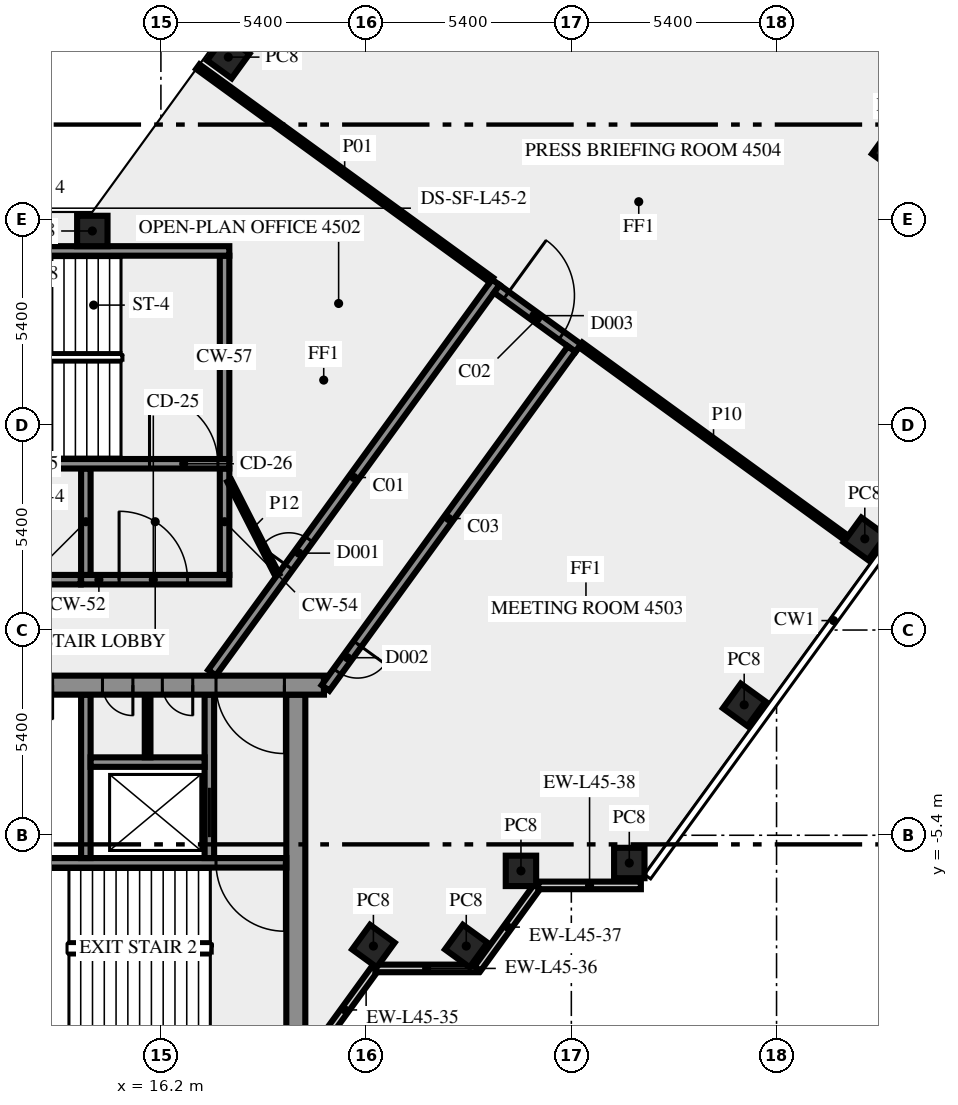
"""IFC4 building model, lengths in metres.
Left out: names, types, materials, properties, quantities, classifications, styles, units other than length and angle.
Written with IfcOpenShell. Run it as: python <this file> out.ifc"""

import sys

from ifc_helpers import new_model, si_unit, direction, frame, frame_2d, origin, origin_2d, place, context, subcontext, project, spatial, rectangle, extrude, element, fill, save


model = new_model("IFC4")
c1 = context("Model", 3, precision=1e-05, world=origin(), true_north=direction((0.0, 1.0)))
c2 = subcontext(c1, "Body", "Model", "MODEL_VIEW")
j1 = project(units=[si_unit("LENGTHUNIT", "METRE"), si_unit("PLANEANGLEUNIT", "RADIAN")], contexts=[c1])
p1 = place(None, origin())
s1 = spatial("IfcSite", under=j1, at=p1, CompositionType="ELEMENT")
p2 = place(p1, origin())
s2 = spatial("IfcBuilding", under=s1, at=p2, CompositionType="ELEMENT")
p3 = place(p2, frame((0.0, 0.0, 194.0)))
s3 = spatial("IfcBuildingStorey", under=s2, at=p3, CompositionType="ELEMENT", Elevation=194.0)
for number, where, z_axis, x_axis in (
    (1, (21.792, -8.315, 0.0), (0.0, 0.0, 1.0), (0.588, 0.809, 0.0)),
    (2, (24.235, -8.315, 0.0), (0.0, 0.0, 1.0), (0.588, 0.809, 0.0)),
    (3, (25.674, -6.337, 0.0), (0.0, 0.0, 1.0), (1.0, 0.0, 0.0)),
    (4, (28.525, -6.13, 0.0), (0.0, 0.0, 1.0), (1.0, 0.0, 0.0)),
    (5, (31.548, -1.969, 0.0), (0.0, 0.0, 1.0), (0.588, 0.809, 0.0)),
    (6, (34.722, 2.4, 0.0), (0.0, 0.0, 1.0), (0.588, 0.809, 0.0)),
    (7, (35.471, 12.616, 0.0), (0.0, 0.0, 1.0), (-0.809, 0.588, 0.0)),
    (8, (17.974, 15.075, 0.0), (0.0, 0.0, 1.0), (-0.588, -0.809, 0.0)),
    (9, (14.395, 10.5, 0.0), (0.0, 0.0, 1.0), (-1.0, 0.0, 0.0)),
):
    element("IfcColumn", number, at=place(p3, frame(where, z_axis=z_axis, x_axis=x_axis)), inside=s3, PredefinedType="COLUMN", context=c2, shape_type="SweptSolid", body=[
        extrude(rectangle(XDim=0.8, YDim=0.8, at=origin_2d()), origin(), (0.0, 0.0, 1.0), 3.65),
    ])
p4 = place(p3, frame((20.253, -11.083, 0.0), z_axis=(0.0, 0.0, 1.0), x_axis=(0.587766567315, 0.809030569476, 0.0)))
e10 = element("IfcWall", 10, at=p4, inside=s3, PredefinedType="SOLIDWALL", context=c2, shape_type="SweptSolid", body=[
    extrude(rectangle(XDim=2.688, YDim=0.2, at=frame_2d((1.344, 0.0))), origin(), (0.0, 0.0, 1.0), 3.65),
])
p5 = place(p3, frame((21.843, -8.904, 0.0), z_axis=(0.0, 0.0, 1.0), x_axis=(1.0, 0.0, 0.0)))
e11 = element("IfcWall", 11, at=p5, inside=s3, PredefinedType="SOLIDWALL", context=c2, shape_type="SweptSolid", body=[
    extrude(rectangle(XDim=2.7, YDim=0.2, at=frame_2d((1.35, 0.0))), origin(), (0.0, 0.0, 1.0), 3.65),
])
p6 = place(p3, frame((24.533, -8.909, 0.0), z_axis=(0.0, 0.0, 1.0), x_axis=(0.587720002413, 0.809064397168, 0.0)))
e12 = element("IfcWall", 12, at=p6, inside=s3, PredefinedType="SOLIDWALL", context=c2, shape_type="SweptSolid", body=[
    extrude(rectangle(XDim=2.7, YDim=0.2, at=frame_2d((1.35, 0.0))), origin(), (0.0, 0.0, 1.0), 3.65),
])
p7 = place(p3, frame((26.13, -6.719, 0.0), z_axis=(0.0, 0.0, 1.0), x_axis=(1.0, 0.0, 0.0)))
e13 = element("IfcWall", 13, at=p7, inside=s3, PredefinedType="SOLIDWALL", context=c2, shape_type="SweptSolid", body=[
    extrude(rectangle(XDim=2.7, YDim=0.2, at=frame_2d((1.35, 0.0))), origin(), (0.0, 0.0, 1.0), 3.65),
])
p8 = place(p3, frame((19.75, -10.5, 0.0), z_axis=(0.0, 0.0, 1.0), x_axis=(0.0, 1.0, 0.0)))
e14 = element("IfcWall", 14, at=p8, inside=s3, PredefinedType="SHEAR", context=c2, shape_type="SweptSolid", body=[
    extrude(rectangle(XDim=8.8, YDim=0.5, at=frame_2d((4.4, 0.0))), origin(), (0.0, 0.0, 1.0), 3.65),
])
p9 = place(p3, frame((19.5, -6.125, 0.0), z_axis=(0.0, 0.0, 1.0), x_axis=(-1.0, 0.0, 0.0)))
e15 = element("IfcWall", 15, at=p9, inside=s3, PredefinedType="SHEAR", context=c2, shape_type="SweptSolid", body=[
    extrude(rectangle(XDim=8.05, YDim=0.25, at=frame_2d((4.025, 0.0))), origin(), (0.0, 0.0, 1.0), 3.65),
])
p10 = place(p9, frame((0.05, 0.0, 0.0)))
e16 = element("IfcOpeningElement", 16, at=p10, cuts=e15, PredefinedType="OPENING", context=c2, shape_type="SweptSolid", body=[
    extrude(rectangle(XDim=1.8, YDim=2.1, at=frame_2d((0.9, 1.05))), frame((0.0, 0.135, 0.0), z_axis=(0.0, -1.0, 0.0), x_axis=(1.0, 0.0, 0.0)), (0.0, 0.0, 1.0), 0.27),
])
p11 = place(p3, frame((14.225, -6.0, 0.0), z_axis=(0.0, 0.0, 1.0), x_axis=(0.0, 1.0, 0.0)))
e17 = element("IfcWall", 17, at=p11, inside=s3, PredefinedType="SHEAR", context=c2, shape_type="SweptSolid", body=[
    extrude(rectangle(XDim=4.3, YDim=0.25, at=frame_2d((2.15, 0.0))), origin(), (0.0, 0.0, 1.0), 3.65),
])
p12 = place(p3, frame((17.475, -6.0, 0.0), z_axis=(0.0, 0.0, 1.0), x_axis=(0.0, 1.0, 0.0)))
e18 = element("IfcWall", 18, at=p12, inside=s3, PredefinedType="SHEAR", context=c2, shape_type="SweptSolid", body=[
    extrude(rectangle(XDim=4.3, YDim=0.25, at=frame_2d((2.15, 0.0))), origin(), (0.0, 0.0, 1.0), 3.65),
])
p13 = place(p12, frame((0.55, 0.0, 0.0)))
e19 = element("IfcOpeningElement", 19, at=p13, cuts=e18, PredefinedType="OPENING", context=c2, shape_type="SweptSolid", body=[
    extrude(rectangle(XDim=1.3, YDim=2.1, at=frame_2d((0.65, 1.05))), frame((0.0, 0.135, 0.0), z_axis=(0.0, -1.0, 0.0), x_axis=(1.0, 0.0, 0.0)), (0.0, 0.0, 1.0), 0.27),
])
p14 = place(p3, frame((14.35, -3.475, 0.0), z_axis=(0.0, 0.0, 1.0), x_axis=(1.0, 0.0, 0.0)))
e20 = element("IfcWall", 20, at=p14, inside=s3, PredefinedType="SHEAR", context=c2, shape_type="SweptSolid", body=[
    extrude(rectangle(XDim=3.0, YDim=0.25, at=frame_2d((1.5, 0.0))), origin(), (0.0, 0.0, 1.0), 3.65),
])
p15 = place(p3, frame((15.85, -3.35, 0.0), z_axis=(0.0, 0.0, 1.0), x_axis=(0.0, 1.0, 0.0)))
e21 = element("IfcWall", 21, at=p15, inside=s3, PredefinedType="PARTITIONING", context=c2, shape_type="SweptSolid", body=[
    extrude(rectangle(XDim=1.65, YDim=0.15, at=frame_2d((0.825, 0.0))), origin(), (0.0, 0.0, 1.0), 3.65),
])
p16 = place(p3, frame((20.49, -1.45, 0.0), z_axis=(0.0, 0.0, 1.0), x_axis=(-1.0, 0.0, 0.0)))
e22 = element("IfcWall", 22, at=p16, inside=s3, PredefinedType="SHEAR", context=c2, shape_type="SweptSolid", body=[
    extrude(rectangle(XDim=40.98, YDim=0.5, at=frame_2d((20.49, 0.0))), origin(), (0.0, 0.0, 1.0), 3.65),
])
p17 = place(p16, frame((38.14, 0.0, 0.0)))
e23 = element("IfcOpeningElement", 23, at=p17, cuts=e22, PredefinedType="OPENING", context=c2, shape_type="SweptSolid", body=[
    extrude(rectangle(XDim=1.8, YDim=2.1, at=frame_2d((0.9, 1.05))), frame((0.0, 0.26, 0.0), z_axis=(0.0, -1.0, 0.0), x_axis=(1.0, 0.0, 0.0)), (0.0, 0.0, 1.0), 0.52),
])
p18 = place(p16, frame((35.89, 0.0, 0.0)))
e24 = element("IfcOpeningElement", 24, at=p18, cuts=e22, PredefinedType="OPENING", context=c2, shape_type="SweptSolid", body=[
    extrude(rectangle(XDim=0.9, YDim=2.1, at=frame_2d((0.45, 1.05))), frame((0.0, 0.26, 0.0), z_axis=(0.0, -1.0, 0.0), x_axis=(1.0, 0.0, 0.0)), (0.0, 0.0, 1.0), 0.52),
])
p19 = place(p16, frame((32.94, 0.0, 0.0)))
e25 = element("IfcOpeningElement", 25, at=p19, cuts=e22, PredefinedType="OPENING", context=c2, shape_type="SweptSolid", body=[
    extrude(rectangle(XDim=0.9, YDim=2.1, at=frame_2d((0.45, 1.05))), frame((0.0, 0.26, 0.0), z_axis=(0.0, -1.0, 0.0), x_axis=(1.0, 0.0, 0.0)), (0.0, 0.0, 1.0), 0.52),
])
p20 = place(p16, frame((30.302, 0.0, 0.0)))
e26 = element("IfcOpeningElement", 26, at=p20, cuts=e22, PredefinedType="OPENING", context=c2, shape_type="SweptSolid", body=[
    extrude(rectangle(XDim=0.9, YDim=2.1, at=frame_2d((0.45, 1.05))), frame((0.0, 0.26, 0.0), z_axis=(0.0, -1.0, 0.0), x_axis=(1.0, 0.0, 0.0)), (0.0, 0.0, 1.0), 0.52),
])
p21 = place(p16, frame((26.577, 0.0, 0.0)))
e27 = element("IfcOpeningElement", 27, at=p21, cuts=e22, PredefinedType="OPENING", context=c2, shape_type="SweptSolid", body=[
    extrude(rectangle(XDim=0.9, YDim=2.1, at=frame_2d((0.45, 1.05))), frame((0.0, 0.26, 0.0), z_axis=(0.0, -1.0, 0.0), x_axis=(1.0, 0.0, 0.0)), (0.0, 0.0, 1.0), 0.52),
])
p22 = place(p16, frame((19.59, 0.0, 0.0)))
e28 = element("IfcOpeningElement", 28, at=p22, cuts=e22, PredefinedType="OPENING", context=c2, shape_type="SweptSolid", body=[
    extrude(rectangle(XDim=2.0, YDim=2.1, at=frame_2d((1.0, 1.05))), frame((0.0, 0.26, 0.0), z_axis=(0.0, -1.0, 0.0), x_axis=(1.0, 0.0, 0.0)), (0.0, 0.0, 1.0), 0.52),
])
p23 = place(p16, frame((7.14, 0.0, 0.0)))
e29 = element("IfcOpeningElement", 29, at=p23, cuts=e22, PredefinedType="OPENING", context=c2, shape_type="SweptSolid", body=[
    extrude(rectangle(XDim=0.9, YDim=2.1, at=frame_2d((0.45, 1.05))), frame((0.0, 0.26, 0.0), z_axis=(0.0, -1.0, 0.0), x_axis=(1.0, 0.0, 0.0)), (0.0, 0.0, 1.0), 0.52),
])
p24 = place(p16, frame((5.028, 0.0, 0.0)))
e30 = element("IfcOpeningElement", 30, at=p24, cuts=e22, PredefinedType="OPENING", context=c2, shape_type="SweptSolid", body=[
    extrude(rectangle(XDim=0.8, YDim=2.1, at=frame_2d((0.4, 1.05))), frame((0.0, 0.26, 0.0), z_axis=(0.0, -1.0, 0.0), x_axis=(1.0, 0.0, 0.0)), (0.0, 0.0, 1.0), 0.52),
])
p25 = place(p16, frame((3.452, 0.0, 0.0)))
e31 = element("IfcOpeningElement", 31, at=p25, cuts=e22, PredefinedType="OPENING", context=c2, shape_type="SweptSolid", body=[
    extrude(rectangle(XDim=0.8, YDim=2.1, at=frame_2d((0.4, 1.05))), frame((0.0, 0.26, 0.0), z_axis=(0.0, -1.0, 0.0), x_axis=(1.0, 0.0, 0.0)), (0.0, 0.0, 1.0), 0.52),
])
p26 = place(p16, frame((1.04, 0.0, 0.0)))
e32 = element("IfcOpeningElement", 32, at=p26, cuts=e22, PredefinedType="OPENING", context=c2, shape_type="SweptSolid", body=[
    extrude(rectangle(XDim=1.8, YDim=2.1, at=frame_2d((0.9, 1.05))), frame((0.0, 0.26, 0.0), z_axis=(0.0, -1.0, 0.0), x_axis=(1.0, 0.0, 0.0)), (0.0, 0.0, 1.0), 0.52),
])
p27 = place(p3, frame((14.1, 1.325, 0.0), z_axis=(0.0, 0.0, 1.0), x_axis=(1.0, 0.0, 0.0)))
e33 = element("IfcWall", 33, at=p27, inside=s3, PredefinedType="SHEAR", context=c2, shape_type="SweptSolid", body=[
    extrude(rectangle(XDim=3.9, YDim=0.25, at=frame_2d((1.95, 0.0))), origin(), (0.0, 0.0, 1.0), 3.65),
])
p28 = place(p27, frame((1.0, 0.0, 0.0)))
e34 = element("IfcOpeningElement", 34, at=p28, cuts=e33, PredefinedType="OPENING", context=c2, shape_type="SweptSolid", body=[
    extrude(rectangle(XDim=1.8, YDim=2.1, at=frame_2d((0.9, 1.05))), frame((0.0, 0.135, 0.0), z_axis=(0.0, -1.0, 0.0), x_axis=(1.0, 0.0, 0.0)), (0.0, 0.0, 1.0), 0.27),
])
for number, where, z_axis, x_axis in (
    (35, (14.225, 1.45, 0.0), (0.0, 0.0, 1.0), (0.0, 1.0, 0.0)),
    (36, (17.875, 1.45, 0.0), (0.0, 0.0, 1.0), (0.0, 1.0, 0.0)),
):
    element("IfcWall", number, at=place(p3, frame(where, z_axis=z_axis, x_axis=x_axis)), inside=s3, PredefinedType="SHEAR", context=c2, shape_type="SweptSolid", body=[
        extrude(rectangle(XDim=2.8, YDim=0.25, at=frame_2d((1.4, 0.0))), origin(), (0.0, 0.0, 1.0), 3.65),
    ])
p29 = place(p3, frame((7.5, 4.375, 0.0), z_axis=(0.0, 0.0, 1.0), x_axis=(1.0, 0.0, 0.0)))
e37 = element("IfcWall", 37, at=p29, inside=s3, PredefinedType="SHEAR", context=c2, shape_type="SweptSolid", body=[
    extrude(rectangle(XDim=10.5, YDim=0.25, at=frame_2d((5.25, 0.0))), origin(), (0.0, 0.0, 1.0), 3.65),
])
p30 = place(p29, frame((8.4, 0.0, 0.0)))
e38 = element("IfcOpeningElement", 38, at=p30, cuts=e37, PredefinedType="OPENING", context=c2, shape_type="SweptSolid", body=[
    extrude(rectangle(XDim=1.8, YDim=2.1, at=frame_2d((0.9, 1.05))), frame((0.0, 0.135, 0.0), z_axis=(0.0, -1.0, 0.0), x_axis=(1.0, 0.0, 0.0)), (0.0, 0.0, 1.0), 0.27),
])
p31 = place(p3, frame((17.875, 4.5, 0.0), z_axis=(0.0, 0.0, 1.0), x_axis=(0.0, 1.0, 0.0)))
e39 = element("IfcWall", 39, at=p31, inside=s3, PredefinedType="SHEAR", context=c2, shape_type="SweptSolid", body=[
    extrude(rectangle(XDim=5.35, YDim=0.25, at=frame_2d((2.675, 0.0))), origin(), (0.0, 0.0, 1.0), 3.65),
])
p32 = place(p3, frame((7.5, 9.975, 0.0), z_axis=(0.0, 0.0, 1.0), x_axis=(1.0, 0.0, 0.0)))
e40 = element("IfcWall", 40, at=p32, inside=s3, PredefinedType="SHEAR", context=c2, shape_type="SweptSolid", body=[
    extrude(rectangle(XDim=10.5, YDim=0.25, at=frame_2d((5.25, 0.0))), origin(), (0.0, 0.0, 1.0), 3.65),
])
p33 = place(p32, frame((2.0, 0.0, 1.0)))
e41 = element("IfcOpeningElement", 41, at=p33, cuts=e40, PredefinedType="OPENING", context=c2, shape_type="SweptSolid", body=[
    extrude(rectangle(XDim=1.2, YDim=1.2, at=frame_2d((0.6, 0.6))), frame((0.0, 0.135, 0.0), z_axis=(0.0, -1.0, 0.0), x_axis=(1.0, 0.0, 0.0)), (0.0, 0.0, 1.0), 0.27),
])
p34 = place(p3, frame((17.545, -1.125, 0.0), z_axis=(0.0, 0.0, 1.0), x_axis=(0.587796810203, 0.809008596935, 0.0)))
e42 = element("IfcWall", 42, at=p34, inside=s3, PredefinedType="SOLIDWALL", context=c2, shape_type="SweptSolid", body=[
    extrude(rectangle(XDim=12.703, YDim=0.25, at=frame_2d((6.352, 0.0))), origin(), (0.0, 0.0, 1.0), 3.65),
])
p35 = place(p34, frame((3.441, 0.0, 0.0)))
e43 = element("IfcOpeningElement", 43, at=p35, cuts=e42, PredefinedType="OPENING", context=c2, shape_type="SweptSolid", body=[
    extrude(rectangle(XDim=0.9, YDim=2.1, at=frame_2d((0.45, 1.05))), frame((0.0, 0.135, 0.0), z_axis=(0.0, -1.0, 0.0), x_axis=(1.0, 0.0, 0.0)), (0.0, 0.0, 1.0), 0.27),
])
p36 = place(p3, frame((25.039, 8.978, 0.0), z_axis=(0.0, 0.0, 1.0), x_axis=(0.809006914995, -0.587799125119, 0.0)))
e44 = element("IfcWall", 44, at=p36, inside=s3, PredefinedType="SOLIDWALL", context=c2, shape_type="SweptSolid", body=[
    extrude(rectangle(XDim=2.65, YDim=0.25, at=frame_2d((1.325, 0.0))), origin(), (0.0, 0.0, 1.0), 3.65),
])
p37 = place(p36, frame((0.301, 0.0, 0.0)))
e45 = element("IfcOpeningElement", 45, at=p37, cuts=e44, PredefinedType="OPENING", context=c2, shape_type="SweptSolid", body=[
    extrude(rectangle(XDim=1.8, YDim=2.1, at=frame_2d((0.9, 1.05))), frame((0.0, 0.135, 0.0), z_axis=(0.0, -1.0, 0.0), x_axis=(1.0, 0.0, 0.0)), (0.0, 0.0, 1.0), 0.27),
])
p38 = place(p3, frame((27.009, 7.392, 0.0), z_axis=(0.0, 0.0, 1.0), x_axis=(-0.587776457057, -0.809023384414, 0.0)))
e46 = element("IfcWall", 46, at=p38, inside=s3, PredefinedType="SOLIDWALL", context=c2, shape_type="SweptSolid", body=[
    extrude(rectangle(XDim=11.021, YDim=0.25, at=frame_2d((5.51, 0.0))), origin(), (0.0, 0.0, 1.0), 3.65),
])
p39 = place(p38, frame((9.588, 0.0, 0.0)))
e47 = element("IfcOpeningElement", 47, at=p39, cuts=e46, PredefinedType="OPENING", context=c2, shape_type="SweptSolid", body=[
    extrude(rectangle(XDim=0.9, YDim=2.1, at=frame_2d((0.45, 1.05))), frame((0.0, 0.135, 0.0), z_axis=(0.0, -1.0, 0.0), x_axis=(1.0, 0.0, 0.0)), (0.0, 0.0, 1.0), 0.27),
])
p40 = place(p3, frame((6.754, 1.325, 0.0), z_axis=(0.0, 0.0, 1.0), x_axis=(1.0, 0.0, 0.0)))
e48 = element("IfcWall", 48, at=p40, inside=s3, PredefinedType="SOLIDWALL", context=c2, shape_type="SweptSolid", body=[
    extrude(rectangle(XDim=7.336, YDim=0.25, at=frame_2d((3.668, 0.0))), origin(), (0.0, 0.0, 1.0), 3.65),
])
p41 = place(p3, frame((24.898, 9.209, 0.0), z_axis=(0.0, 0.0, 1.0), x_axis=(-0.809013490065, 0.587790075531, 0.0)))
e49 = element("IfcWall", 49, at=p41, inside=s3, PredefinedType="PARTITIONING", context=c2, shape_type="SweptSolid", body=[
    extrude(rectangle(XDim=9.549, YDim=0.15, at=frame_2d((4.775, 0.0))), origin(), (0.0, 0.0, 1.0), 2.85),
])
p42 = place(p3, frame((34.239, 2.423, 0.0), z_axis=(0.0, 0.0, 1.0), x_axis=(-0.809024209643, 0.5877753212, 0.0)))
e50 = element("IfcWall", 50, at=p42, inside=s3, PredefinedType="PARTITIONING", context=c2, shape_type="SweptSolid", body=[
    extrude(rectangle(XDim=8.645, YDim=0.15, at=frame_2d((4.322, 0.0))), origin(), (0.0, 0.0, 1.0), 3.65),
])
p43 = place(p3, frame((18.0, 3.925, 0.0), z_axis=(0.0, 0.0, 1.0), x_axis=(0.453950796792, -0.891026752736, 0.0)))
e51 = element("IfcWall", 51, at=p43, inside=s3, PredefinedType="PARTITIONING", context=c2, shape_type="SweptSolid", body=[
    extrude(rectangle(XDim=2.778, YDim=0.12, at=frame_2d((1.389, 0.0))), origin(), (0.0, 0.0, 1.0), 3.65),
])
p44 = place(p10, origin())
e52 = element("IfcDoor", 52, at=p44, inside=s3, OperationType="DOUBLE_DOOR_SINGLE_SWING", PredefinedType="DOOR", context=c2, shape_type="SweptSolid", body=[
    extrude(rectangle(XDim=1.8, YDim=2.1, at=frame_2d((0.9, 1.05))), frame((0.0, 0.025, 0.0), z_axis=(0.0, -1.0, 0.0), x_axis=(1.0, 0.0, 0.0)), (0.0, 0.0, 1.0), 0.05),
])
fill(e16, e52)
p45 = place(p13, origin())
e53 = element("IfcDoor", 53, at=p45, inside=s3, OperationType="DOUBLE_DOOR_SLIDING", PredefinedType="DOOR", context=c2, shape_type="SweptSolid", body=[
    extrude(rectangle(XDim=1.3, YDim=2.1, at=frame_2d((0.65, 1.05))), frame((0.0, 0.025, 0.0), z_axis=(0.0, -1.0, 0.0), x_axis=(1.0, 0.0, 0.0)), (0.0, 0.0, 1.0), 0.05),
])
fill(e19, e53)
p46 = place(p24, origin())
e54 = element("IfcDoor", 54, at=p46, inside=s3, OperationType="SINGLE_SWING_LEFT", PredefinedType="DOOR", context=c2, shape_type="SweptSolid", body=[
    extrude(rectangle(XDim=0.8, YDim=2.1, at=frame_2d((0.4, 1.05))), frame((0.0, 0.025, 0.0), z_axis=(0.0, -1.0, 0.0), x_axis=(1.0, 0.0, 0.0)), (0.0, 0.0, 1.0), 0.05),
])
fill(e30, e54)
p47 = place(p25, origin())
e55 = element("IfcDoor", 55, at=p47, inside=s3, OperationType="SINGLE_SWING_LEFT", PredefinedType="DOOR", context=c2, shape_type="SweptSolid", body=[
    extrude(rectangle(XDim=0.8, YDim=2.1, at=frame_2d((0.4, 1.05))), frame((0.0, 0.025, 0.0), z_axis=(0.0, -1.0, 0.0), x_axis=(1.0, 0.0, 0.0)), (0.0, 0.0, 1.0), 0.05),
])
fill(e31, e55)
p48 = place(p26, origin())
e56 = element("IfcDoor", 56, at=p48, inside=s3, OperationType="DOUBLE_DOOR_SINGLE_SWING", PredefinedType="DOOR", context=c2, shape_type="SweptSolid", body=[
    extrude(rectangle(XDim=1.8, YDim=2.1, at=frame_2d((0.9, 1.05))), frame((0.0, 0.025, 0.0), z_axis=(0.0, -1.0, 0.0), x_axis=(1.0, 0.0, 0.0)), (0.0, 0.0, 1.0), 0.05),
])
fill(e32, e56)
p49 = place(p28, origin())
e57 = element("IfcDoor", 57, at=p49, inside=s3, OperationType="DOUBLE_DOOR_SINGLE_SWING", PredefinedType="DOOR", context=c2, shape_type="SweptSolid", body=[
    extrude(rectangle(XDim=1.8, YDim=2.1, at=frame_2d((0.9, 1.05))), frame((0.0, 0.025, 0.0), z_axis=(0.0, -1.0, 0.0), x_axis=(1.0, 0.0, 0.0)), (0.0, 0.0, 1.0), 0.05),
])
fill(e34, e57)
p50 = place(p30, origin())
e58 = element("IfcDoor", 58, at=p50, inside=s3, OperationType="DOUBLE_DOOR_SINGLE_SWING", PredefinedType="DOOR", context=c2, shape_type="SweptSolid", body=[
    extrude(rectangle(XDim=1.8, YDim=2.1, at=frame_2d((0.9, 1.05))), frame((0.0, 0.025, 0.0), z_axis=(0.0, -1.0, 0.0), x_axis=(1.0, 0.0, 0.0)), (0.0, 0.0, 1.0), 0.05),
])
fill(e38, e58)
p51 = place(p35, origin())
e59 = element("IfcDoor", 59, at=p51, inside=s3, OperationType="SINGLE_SWING_LEFT", PredefinedType="DOOR", context=c2, shape_type="SweptSolid", body=[
    extrude(rectangle(XDim=0.9, YDim=2.1, at=frame_2d((0.45, 1.05))), frame((0.0, 0.025, 0.0), z_axis=(0.0, -1.0, 0.0), x_axis=(1.0, 0.0, 0.0)), (0.0, 0.0, 1.0), 0.05),
])
fill(e43, e59)
p52 = place(p39, origin())
e60 = element("IfcDoor", 60, at=p52, inside=s3, OperationType="SINGLE_SWING_RIGHT", PredefinedType="DOOR", context=c2, shape_type="SweptSolid", body=[
    extrude(rectangle(XDim=0.9, YDim=2.1, at=frame_2d((0.45, 1.05))), frame((0.0, 0.025, 0.0), z_axis=(0.0, -1.0, 0.0), x_axis=(1.0, 0.0, 0.0)), (0.0, 0.0, 1.0), 0.05),
])
fill(e47, e60)
p53 = place(p37, origin())
e61 = element("IfcDoor", 61, at=p53, inside=s3, OperationType="DOUBLE_DOOR_SINGLE_SWING", PredefinedType="DOOR", context=c2, shape_type="SweptSolid", body=[
    extrude(rectangle(XDim=1.8, YDim=2.1, at=frame_2d((0.9, 1.05))), frame((0.0, 0.025, 0.0), z_axis=(0.0, -1.0, 0.0), x_axis=(1.0, 0.0, 0.0)), (0.0, 0.0, 1.0), 0.05),
])
fill(e45, e61)
save(model, sys.argv[1])
